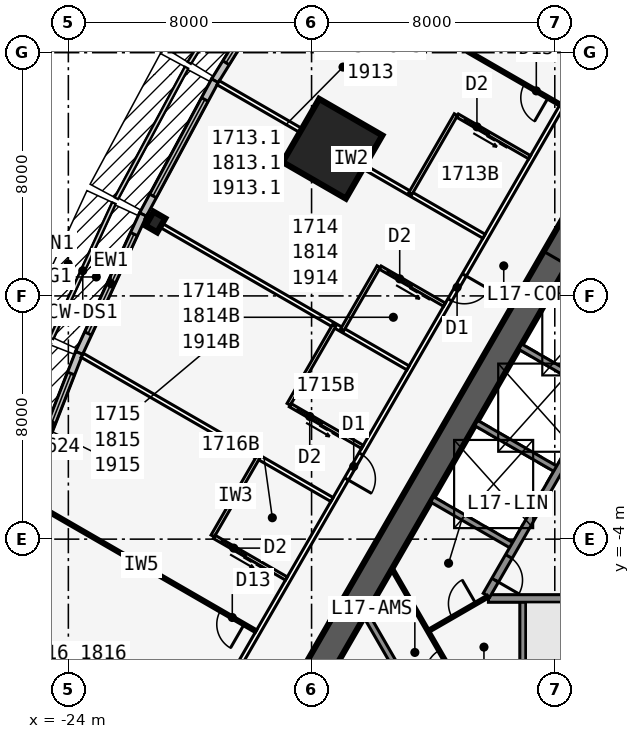
"""IFC4 building model, lengths in metres.
Left out: names, types, materials, properties, quantities, classifications, styles, units other than length and angle.
Written with IfcOpenShell. Run it as: python <this file> out.ifc"""

import sys

from ifc_helpers import new_model, si_unit, direction, frame, frame_2d, origin, origin_2d, place, context, subcontext, project, spatial, rectangle, i_section, extrude, element, fill, save


model = new_model("IFC4")
c1 = context("Model", 3, precision=1e-05, world=origin(), true_north=direction((0.0, 1.0)))
c2 = subcontext(c1, "Body", "Model", "MODEL_VIEW")
j1 = project(units=[si_unit("LENGTHUNIT", "METRE"), si_unit("PLANEANGLEUNIT", "RADIAN")], contexts=[c1])
p1 = place(None, origin())
s1 = spatial("IfcSite", under=j1, at=p1, CompositionType="ELEMENT")
p2 = place(p1, origin())
s2 = spatial("IfcBuilding", under=s1, at=p2, CompositionType="ELEMENT")
p3 = place(p2, frame((0.0, 0.0, 69.3)))
s3 = spatial("IfcBuildingStorey", under=s2, at=p3, CompositionType="ELEMENT", Elevation=69.3)
p4 = place(p3, frame((-10.183, -5.951, 0.0), z_axis=(0.0, 0.0, 1.0), x_axis=(1.0, 0.0, 0.0)))
e1 = element("IfcWall", 1, at=p4, inside=s3, PredefinedType="SOLIDWALL", context=c2, shape_type="SweptSolid", body=[
    extrude(rectangle(XDim=7.633, YDim=0.25, at=frame_2d((3.816, 0.0))), origin(), (0.0, 0.0, 1.0), 3.235),
])
p5 = place(p3, frame((-9.05, -5.951, 0.0), z_axis=(0.0, 0.0, 1.0), x_axis=(0.0, -1.0, 0.0)))
e2 = element("IfcWall", 2, at=p5, inside=s3, PredefinedType="SOLIDWALL", context=c2, shape_type="SweptSolid", body=[
    extrude(rectangle(XDim=3.125, YDim=0.2, at=frame_2d((1.562, 0.0))), origin(), (0.0, 0.0, 1.0), 3.235),
])
p6 = place(p3, frame((0.0, 19.052, 0.0), z_axis=(0.0, 0.0, 1.0), x_axis=(-0.499999749417, -0.866025548458, 0.0)))
e3 = element("IfcWall", 3, at=p6, inside=s3, PredefinedType="SHEAR", context=c2, shape_type="SweptSolid", body=[
    extrude(rectangle(XDim=33.0, YDim=0.9, at=frame_2d((16.5, 0.0))), origin(), (0.0, 0.0, 1.0), 3.4),
])
p7 = place(p6, frame((14.15, 0.0, 0.0)))
e4 = element("IfcOpeningElement", 4, at=p7, cuts=e3, PredefinedType="OPENING", context=c2, shape_type="SweptSolid", body=[
    extrude(rectangle(XDim=1.8, YDim=2.13, at=frame_2d((0.9, 1.065))), frame((0.0, 0.46, 0.0), z_axis=(0.0, -1.0, 0.0), x_axis=(1.0, 0.0, 0.0)), (0.0, 0.0, 1.0), 0.92),
])
p8 = place(p6, frame((12.6, 0.0, 0.0)))
e5 = element("IfcOpeningElement", 5, at=p8, cuts=e3, PredefinedType="OPENING", context=c2, shape_type="SweptSolid", body=[
    extrude(rectangle(XDim=1.0, YDim=2.13, at=frame_2d((0.5, 1.065))), frame((0.0, 0.46, 0.0), z_axis=(0.0, -1.0, 0.0), x_axis=(1.0, 0.0, 0.0)), (0.0, 0.0, 1.0), 0.92),
])
p9 = place(p3, frame((-4.929, 3.365, 0.0), z_axis=(0.0, 0.0, 1.0), x_axis=(-0.499991433582, -0.866030349552, 0.0)))
e6 = element("IfcWall", 6, at=p9, inside=s3, PredefinedType="SOLIDWALL", context=c2, shape_type="SweptSolid", body=[
    extrude(rectangle(XDim=10.633, YDim=0.25, at=frame_2d((5.316, 0.0))), origin(), (0.0, 0.0, 1.0), 3.235),
])
p10 = place(p9, frame((9.164, 0.0, 0.0)))
e7 = element("IfcOpeningElement", 7, at=p10, cuts=e6, PredefinedType="OPENING", context=c2, shape_type="SweptSolid", body=[
    extrude(rectangle(XDim=0.9, YDim=2.13, at=frame_2d((0.45, 1.065))), frame((0.0, 0.135, 0.0), z_axis=(0.0, -1.0, 0.0), x_axis=(1.0, 0.0, 0.0)), (0.0, 0.0, 1.0), 0.27),
])
for number, where, z_axis, x_axis in (
    (8, (-6.429, 0.767, 0.0), (0.0, 0.0, 1.0), (-0.866, 0.5, 0.0)),
    (9, (-7.879, -1.744, 0.0), (0.0, 0.0, 1.0), (-0.866, 0.5, 0.0)),
    (10, (-9.329, -4.256, 0.0), (0.0, 0.0, 1.0), (-0.866, 0.5, 0.0)),
):
    element("IfcWall", number, at=place(p3, frame(where, z_axis=z_axis, x_axis=x_axis)), inside=s3, PredefinedType="SOLIDWALL", context=c2, shape_type="SweptSolid", body=[
        extrude(rectangle(XDim=3.125, YDim=0.2, at=frame_2d((1.562, 0.0))), origin(), (0.0, 0.0, 1.0), 3.235),
    ])
p11 = place(p3, frame((-21.137, 6.43, 0.0), z_axis=(0.0, 0.0, 1.0), x_axis=(-0.866025403784, 0.5, 0.0)))
e11 = element("IfcColumn", 11, at=p11, inside=s3, PredefinedType="COLUMN", context=c2, shape_type="SweptSolid", body=[
    extrude(i_section(OverallWidth=0.442, OverallDepth=0.531, WebThickness=0.066, FlangeThickness=0.106, at=origin_2d()), origin(), (0.0, 0.0, 1.0), 3.4),
])
p12 = place(p3, frame((-15.312, 8.84, 0.0), z_axis=(0.0, 0.0, 1.0), x_axis=(-0.866025403784, 0.5, 0.0)))
e12 = element("IfcColumn", 12, at=p12, inside=s3, PredefinedType="COLUMN", context=c2, shape_type="SweptSolid", body=[
    extrude(rectangle(XDim=2.4, YDim=2.4, at=origin_2d()), origin(), (0.0, 0.0, 1.0), 3.4),
])
p13 = place(p3, frame((-16.551, 15.324, 0.0), z_axis=(0.0, 0.0, 1.0), x_axis=(-0.526132807704, -0.850402415717, 0.0)))
e13 = element("IfcWall", 13, at=p13, inside=s3, PredefinedType="STANDARD", context=c2, shape_type="SweptSolid", body=[
    extrude(rectangle(XDim=5.002, YDim=0.25, at=frame_2d((2.501, 0.0))), origin(), (0.0, 0.0, 1.0), 3.235),
])
p14 = place(p13, frame((0.701, 0.0, 0.45)))
e14 = element("IfcOpeningElement", 14, at=p14, cuts=e13, PredefinedType="OPENING", context=c2, shape_type="SweptSolid", body=[
    extrude(rectangle(XDim=3.6, YDim=2.4, at=frame_2d((1.8, 1.2))), frame((0.0, 0.135, 0.0), z_axis=(0.0, -1.0, 0.0), x_axis=(1.0, 0.0, 0.0)), (0.0, 0.0, 1.0), 0.27),
])
p15 = place(p3, frame((-19.178, 11.077, 0.0), z_axis=(0.0, 0.0, 1.0), x_axis=(-0.473412820489, -0.880840678782, 0.0)))
e15 = element("IfcWall", 15, at=p15, inside=s3, PredefinedType="STANDARD", context=c2, shape_type="SweptSolid", body=[
    extrude(rectangle(XDim=5.002, YDim=0.25, at=frame_2d((2.501, 0.0))), origin(), (0.0, 0.0, 1.0), 3.235),
])
p16 = place(p15, frame((0.701, 0.0, 0.45)))
e16 = element("IfcOpeningElement", 16, at=p16, cuts=e15, PredefinedType="OPENING", context=c2, shape_type="SweptSolid", body=[
    extrude(rectangle(XDim=3.6, YDim=2.4, at=frame_2d((1.8, 1.2))), frame((0.0, 0.135, 0.0), z_axis=(0.0, -1.0, 0.0), x_axis=(1.0, 0.0, 0.0)), (0.0, 0.0, 1.0), 0.27),
])
p17 = place(p3, frame((-21.543, 6.678, 0.0), z_axis=(0.0, 0.0, 1.0), x_axis=(-0.419203100754, -0.907892482796, 0.0)))
e17 = element("IfcWall", 17, at=p17, inside=s3, PredefinedType="STANDARD", context=c2, shape_type="SweptSolid", body=[
    extrude(rectangle(XDim=5.021, YDim=0.25, at=frame_2d((2.51, 0.0))), origin(), (0.0, 0.0, 1.0), 3.235),
])
p18 = place(p17, frame((0.71, 0.0, 0.45)))
e18 = element("IfcOpeningElement", 18, at=p18, cuts=e17, PredefinedType="OPENING", context=c2, shape_type="SweptSolid", body=[
    extrude(rectangle(XDim=3.6, YDim=2.4, at=frame_2d((1.8, 1.2))), frame((0.0, 0.135, 0.0), z_axis=(0.0, -1.0, 0.0), x_axis=(1.0, 0.0, 0.0)), (0.0, 0.0, 1.0), 0.27),
])
p19 = place(p3, frame((-23.645, 2.126, 0.0), z_axis=(0.0, 0.0, 1.0), x_axis=(-0.364013463868, -0.931393685894, 0.0)))
e19 = element("IfcWall", 19, at=p19, inside=s3, PredefinedType="STANDARD", context=c2, shape_type="SweptSolid", body=[
    extrude(rectangle(XDim=5.058, YDim=0.25, at=frame_2d((2.529, 0.0))), origin(), (0.0, 0.0, 1.0), 3.235),
])
p20 = place(p19, frame((0.729, 0.0, 0.45)))
e20 = element("IfcOpeningElement", 20, at=p20, cuts=e19, PredefinedType="OPENING", context=c2, shape_type="SweptSolid", body=[
    extrude(rectangle(XDim=3.6, YDim=2.4, at=frame_2d((1.8, 1.2))), frame((0.0, 0.135, 0.0), z_axis=(0.0, -1.0, 0.0), x_axis=(1.0, 0.0, 0.0)), (0.0, 0.0, 1.0), 0.27),
])
p21 = place(p3, frame((-0.5, 22.836, 0.0), z_axis=(0.0, 0.0, 1.0), x_axis=(-0.500001677587, -0.866024435227, 0.0)))
e21 = element("IfcWall", 21, at=p21, inside=s3, PredefinedType="PARTITIONING", context=c2, shape_type="SweptSolid", body=[
    extrude(rectangle(XDim=39.054, YDim=0.15, at=frame_2d((19.527, 0.0))), origin(), (0.0, 0.0, 1.0), 3.235),
])
p22 = place(p21, frame((1.558, 0.0, 0.0)))
e22 = element("IfcOpeningElement", 22, at=p22, cuts=e21, PredefinedType="OPENING", context=c2, shape_type="SweptSolid", body=[
    extrude(rectangle(XDim=0.95, YDim=2.13, at=frame_2d((0.475, 1.065))), frame((0.0, 0.085, 0.0), z_axis=(0.0, -1.0, 0.0), x_axis=(1.0, 0.0, 0.0)), (0.0, 0.0, 1.0), 0.17),
])
p23 = place(p21, frame((11.552, 0.0, 0.0)))
e23 = element("IfcOpeningElement", 23, at=p23, cuts=e21, PredefinedType="OPENING", context=c2, shape_type="SweptSolid", body=[
    extrude(rectangle(XDim=0.95, YDim=2.13, at=frame_2d((0.475, 1.065))), frame((0.0, 0.085, 0.0), z_axis=(0.0, -1.0, 0.0), x_axis=(1.0, 0.0, 0.0)), (0.0, 0.0, 1.0), 0.17),
])
p24 = place(p21, frame((20.952, 0.0, 0.0)))
e24 = element("IfcOpeningElement", 24, at=p24, cuts=e21, PredefinedType="OPENING", context=c2, shape_type="SweptSolid", body=[
    extrude(rectangle(XDim=0.95, YDim=2.13, at=frame_2d((0.475, 1.065))), frame((0.0, 0.085, 0.0), z_axis=(0.0, -1.0, 0.0), x_axis=(1.0, 0.0, 0.0)), (0.0, 0.0, 1.0), 0.17),
])
p25 = place(p21, frame((27.752, 0.0, 0.0)))
e25 = element("IfcOpeningElement", 25, at=p25, cuts=e21, PredefinedType="OPENING", context=c2, shape_type="SweptSolid", body=[
    extrude(rectangle(XDim=0.95, YDim=2.13, at=frame_2d((0.475, 1.065))), frame((0.0, 0.085, 0.0), z_axis=(0.0, -1.0, 0.0), x_axis=(1.0, 0.0, 0.0)), (0.0, 0.0, 1.0), 0.17),
])
p26 = place(p21, frame((36.546, 0.0, 0.0)))
e26 = element("IfcOpeningElement", 26, at=p26, cuts=e21, PredefinedType="OPENING", context=c2, shape_type="SweptSolid", body=[
    extrude(rectangle(XDim=0.95, YDim=2.13, at=frame_2d((0.475, 1.065))), frame((0.0, 0.085, 0.0), z_axis=(0.0, -1.0, 0.0), x_axis=(1.0, 0.0, 0.0)), (0.0, 0.0, 1.0), 0.17),
])
p27 = place(p3, frame((-7.829, 10.293, 0.0), z_axis=(0.0, 0.0, 1.0), x_axis=(-0.866016302457, 0.50001576363, 0.0)))
e27 = element("IfcWall", 27, at=p27, inside=s3, PredefinedType="PARTITIONING", context=c2, shape_type="SweptSolid", body=[
    extrude(rectangle(XDim=9.943, YDim=0.1, at=frame_2d((4.972, 0.0))), origin(), (0.0, 0.0, 1.0), 2.389),
])
p28 = place(p27, frame((0.45, 0.0, 0.0)))
e28 = element("IfcOpeningElement", 28, at=p28, cuts=e27, PredefinedType="OPENING", context=c2, shape_type="SweptSolid", body=[
    extrude(rectangle(XDim=0.9, YDim=2.13, at=frame_2d((0.45, 1.065))), frame((0.0, 0.06, 0.0), z_axis=(0.0, -1.0, 0.0), x_axis=(1.0, 0.0, 0.0)), (0.0, 0.0, 1.0), 0.12),
])
p29 = place(p3, frame((-10.329, 5.963, 0.0), z_axis=(0.0, 0.0, 1.0), x_axis=(-0.866021688545, 0.500006434927, 0.0)))
e29 = element("IfcWall", 29, at=p29, inside=s3, PredefinedType="PARTITIONING", context=c2, shape_type="SweptSolid", body=[
    extrude(rectangle(XDim=10.096, YDim=0.15, at=frame_2d((5.048, 0.0))), origin(), (0.0, 0.0, 1.0), 2.389),
])
p30 = place(p3, frame((-12.829, 1.633, 0.0), z_axis=(0.0, 0.0, 1.0), x_axis=(-0.866026934769, 0.499997348248, 0.0)))
e30 = element("IfcWall", 30, at=p30, inside=s3, PredefinedType="PARTITIONING", context=c2, shape_type="SweptSolid", body=[
    extrude(rectangle(XDim=9.943, YDim=0.15, at=frame_2d((4.971, 0.0))), origin(), (0.0, 0.0, 1.0), 2.389),
])
p31 = place(p3, frame((-15.329, -2.697, 0.0), z_axis=(0.0, 0.0, 1.0), x_axis=(-0.866018409083, 0.500012114982, 0.0)))
e31 = element("IfcWall", 31, at=p31, inside=s3, PredefinedType="PARTITIONING", context=c2, shape_type="SweptSolid", body=[
    extrude(rectangle(XDim=9.485, YDim=0.15, at=frame_2d((4.742, 0.0))), origin(), (0.0, 0.0, 1.0), 2.389),
])
p32 = place(p3, frame((-17.829, -7.027, 0.0), z_axis=(0.0, 0.0, 1.0), x_axis=(-0.866032659912, 0.499987431809, 0.0)))
e32 = element("IfcWall", 32, at=p32, inside=s3, PredefinedType="PARTITIONING", context=c2, shape_type="SweptSolid", body=[
    extrude(rectangle(XDim=8.72, YDim=0.1, at=frame_2d((4.36, 0.0))), origin(), (0.0, 0.0, 1.0), 2.389),
])
p33 = place(p32, frame((0.45, 0.0, 0.0)))
e33 = element("IfcOpeningElement", 33, at=p33, cuts=e32, PredefinedType="OPENING", context=c2, shape_type="SweptSolid", body=[
    extrude(rectangle(XDim=0.9, YDim=2.13, at=frame_2d((0.45, 1.065))), frame((0.0, 0.06, 0.0), z_axis=(0.0, -1.0, 0.0), x_axis=(1.0, 0.0, 0.0)), (0.0, 0.0, 1.0), 0.12),
])
p34 = place(p3, frame((-11.253, 9.961, 0.0), z_axis=(0.0, 0.0, 1.0), x_axis=(-0.499990139034, -0.866031096941, 0.0)))
e34 = element("IfcWall", 34, at=p34, inside=s3, PredefinedType="PLUMBINGWALL", context=c2, shape_type="SweptSolid", body=[
    extrude(rectangle(XDim=3.0, YDim=0.12, at=frame_2d((1.5, 0.0))), origin(), (0.0, 0.0, 1.0), 3.235),
])
p35 = place(p3, frame((-8.829, 8.561, 0.0), z_axis=(0.0, 0.0, 1.0), x_axis=(-0.866035715982, 0.499982138324, 0.0)))
e35 = element("IfcWall", 35, at=p35, inside=s3, PredefinedType="PLUMBINGWALL", context=c2, shape_type="SweptSolid", body=[
    extrude(rectangle(XDim=2.74, YDim=0.12, at=frame_2d((1.37, 0.0))), origin(), (0.0, 0.0, 1.0), 3.235),
])
p36 = place(p35, frame((1.55, 0.0, 0.0)))
e36 = element("IfcOpeningElement", 36, at=p36, cuts=e35, PredefinedType="OPENING", context=c2, shape_type="SweptSolid", body=[
    extrude(rectangle(XDim=0.9, YDim=2.13, at=frame_2d((0.45, 1.065))), frame((0.0, 0.07, 0.0), z_axis=(0.0, -1.0, 0.0), x_axis=(1.0, 0.0, 0.0)), (0.0, 0.0, 1.0), 0.14),
])
p37 = place(p3, frame((-13.793, 4.961, 0.0), z_axis=(0.0, 0.0, 1.0), x_axis=(-0.500001309137, -0.866024647952, 0.0)))
e37 = element("IfcWall", 37, at=p37, inside=s3, PredefinedType="PLUMBINGWALL", context=c2, shape_type="SweptSolid", body=[
    extrude(rectangle(XDim=2.4, YDim=0.12, at=frame_2d((1.2, 0.0))), origin(), (0.0, 0.0, 1.0), 3.235),
])
p38 = place(p3, frame((-11.628, 3.711, 0.0), z_axis=(0.0, 0.0, 1.0), x_axis=(-0.866048967903, 0.499959183527, 0.0)))
e38 = element("IfcWall", 38, at=p38, inside=s3, PredefinedType="PLUMBINGWALL", context=c2, shape_type="SweptSolid", body=[
    extrude(rectangle(XDim=2.44, YDim=0.12, at=frame_2d((1.22, 0.0))), origin(), (0.0, 0.0, 1.0), 3.235),
])
p39 = place(p38, frame((1.25, 0.0, 0.0)))
e39 = element("IfcOpeningElement", 39, at=p39, cuts=e38, PredefinedType="OPENING", context=c2, shape_type="SweptSolid", body=[
    extrude(rectangle(XDim=0.9, YDim=2.13, at=frame_2d((0.45, 1.065))), frame((0.0, 0.07, 0.0), z_axis=(0.0, -1.0, 0.0), x_axis=(1.0, 0.0, 0.0)), (0.0, 0.0, 1.0), 0.14),
])
p40 = place(p3, frame((-15.253, 3.033, 0.0), z_axis=(0.0, 0.0, 1.0), x_axis=(-0.499990139034, -0.866031096941, 0.0)))
e40 = element("IfcWall", 40, at=p40, inside=s3, PredefinedType="PLUMBINGWALL", context=c2, shape_type="SweptSolid", body=[
    extrude(rectangle(XDim=3.0, YDim=0.12, at=frame_2d((1.5, 0.0))), origin(), (0.0, 0.0, 1.0), 3.235),
])
p41 = place(p3, frame((-14.329, -0.965, 0.0), z_axis=(0.0, 0.0, 1.0), x_axis=(-0.866035715982, 0.499982138324, 0.0)))
e41 = element("IfcWall", 41, at=p41, inside=s3, PredefinedType="PLUMBINGWALL", context=c2, shape_type="SweptSolid", body=[
    extrude(rectangle(XDim=2.74, YDim=0.12, at=frame_2d((1.37, 0.0))), origin(), (0.0, 0.0, 1.0), 3.235),
])
p42 = place(p41, frame((1.55, 0.0, 0.0)))
e42 = element("IfcOpeningElement", 42, at=p42, cuts=e41, PredefinedType="OPENING", context=c2, shape_type="SweptSolid", body=[
    extrude(rectangle(XDim=0.9, YDim=2.13, at=frame_2d((0.45, 1.065))), frame((0.0, 0.07, 0.0), z_axis=(0.0, -1.0, 0.0), x_axis=(1.0, 0.0, 0.0)), (0.0, 0.0, 1.0), 0.14),
])
p43 = place(p3, frame((-17.753, -1.297, 0.0), z_axis=(0.0, 0.0, 1.0), x_axis=(-0.499990139034, -0.866031096941, 0.0)))
e43 = element("IfcWall", 43, at=p43, inside=s3, PredefinedType="PLUMBINGWALL", context=c2, shape_type="SweptSolid", body=[
    extrude(rectangle(XDim=3.0, YDim=0.12, at=frame_2d((1.5, 0.0))), origin(), (0.0, 0.0, 1.0), 3.235),
])
p44 = place(p3, frame((-16.829, -5.295, 0.0), z_axis=(0.0, 0.0, 1.0), x_axis=(-0.866035715982, 0.499982138324, 0.0)))
e44 = element("IfcWall", 44, at=p44, inside=s3, PredefinedType="PLUMBINGWALL", context=c2, shape_type="SweptSolid", body=[
    extrude(rectangle(XDim=2.74, YDim=0.12, at=frame_2d((1.37, 0.0))), origin(), (0.0, 0.0, 1.0), 3.235),
])
p45 = place(p44, frame((1.55, 0.0, 0.0)))
e45 = element("IfcOpeningElement", 45, at=p45, cuts=e44, PredefinedType="OPENING", context=c2, shape_type="SweptSolid", body=[
    extrude(rectangle(XDim=0.9, YDim=2.13, at=frame_2d((0.45, 1.065))), frame((0.0, 0.07, 0.0), z_axis=(0.0, -1.0, 0.0), x_axis=(1.0, 0.0, 0.0)), (0.0, 0.0, 1.0), 0.14),
])
p46 = place(p3, frame((-12.719, -9.076, 0.0), z_axis=(0.0, 0.0, 1.0), x_axis=(-0.499952404951, 0.866052881055, 0.0)))
e46 = element("IfcWall", 46, at=p46, inside=s3, PredefinedType="SOLIDWALL", context=c2, shape_type="SweptSolid", body=[
    extrude(rectangle(XDim=3.002, YDim=0.2, at=frame_2d((1.501, 0.0))), origin(), (0.0, 0.0, 1.0), 3.235),
])
p47 = place(p3, frame((-10.986, -9.076, 0.0), z_axis=(0.0, 0.0, 1.0), x_axis=(-0.499999210213, 0.866025859768, 0.0)))
e47 = element("IfcWall", 47, at=p47, inside=s3, PredefinedType="PARTITIONING", context=c2, shape_type="SweptSolid", body=[
    extrude(rectangle(XDim=4.734, YDim=0.1, at=frame_2d((2.367, 0.0))), origin(), (0.0, 0.0, 1.0), 3.235),
])
p48 = place(p47, frame((0.734, 0.0, 0.0)))
e48 = element("IfcOpeningElement", 48, at=p48, cuts=e47, PredefinedType="OPENING", context=c2, shape_type="SweptSolid", body=[
    extrude(rectangle(XDim=0.9, YDim=2.13, at=frame_2d((0.45, 1.065))), frame((0.0, 0.06, 0.0), z_axis=(0.0, -1.0, 0.0), x_axis=(1.0, 0.0, 0.0)), (0.0, 0.0, 1.0), 0.12),
])
p49 = place(p3, frame((-12.17, -7.026, 0.0), z_axis=(0.0, 0.0, 1.0), x_axis=(0.866015833478, 0.50001657589, 0.0)))
e49 = element("IfcWall", 49, at=p49, inside=s3, PredefinedType="PARTITIONING", context=c2, shape_type="SweptSolid", body=[
    extrude(rectangle(XDim=2.275, YDim=0.1, at=frame_2d((1.138, 0.0))), origin(), (0.0, 0.0, 1.0), 3.235),
])
p50 = place(p49, frame((0.915, 0.0, 0.0)))
e50 = element("IfcOpeningElement", 50, at=p50, cuts=e49, PredefinedType="OPENING", context=c2, shape_type="SweptSolid", body=[
    extrude(rectangle(XDim=0.9, YDim=2.13, at=frame_2d((0.45, 1.065))), frame((0.0, 0.06, 0.0), z_axis=(0.0, -1.0, 0.0), x_axis=(1.0, 0.0, 0.0)), (0.0, 0.0, 1.0), 0.12),
])
p51 = place(p14, origin())
e51 = element("IfcWindow", 51, at=p51, inside=s3, PartitioningType="SINGLE_PANEL", PredefinedType="WINDOW", context=c2, shape_type="SweptSolid", body=[
    extrude(rectangle(XDim=3.6, YDim=2.4, at=frame_2d((1.8, 1.2))), frame((0.0, 0.03, 0.0), z_axis=(0.0, -1.0, 0.0), x_axis=(1.0, 0.0, 0.0)), (0.0, 0.0, 1.0), 0.06),
])
fill(e14, e51)
p52 = place(p16, origin())
e52 = element("IfcWindow", 52, at=p52, inside=s3, PartitioningType="SINGLE_PANEL", PredefinedType="WINDOW", context=c2, shape_type="SweptSolid", body=[
    extrude(rectangle(XDim=3.6, YDim=2.4, at=frame_2d((1.8, 1.2))), frame((0.0, 0.03, 0.0), z_axis=(0.0, -1.0, 0.0), x_axis=(1.0, 0.0, 0.0)), (0.0, 0.0, 1.0), 0.06),
])
fill(e16, e52)
p53 = place(p18, origin())
e53 = element("IfcWindow", 53, at=p53, inside=s3, PartitioningType="SINGLE_PANEL", PredefinedType="WINDOW", context=c2, shape_type="SweptSolid", body=[
    extrude(rectangle(XDim=3.6, YDim=2.4, at=frame_2d((1.8, 1.2))), frame((0.0, 0.03, 0.0), z_axis=(0.0, -1.0, 0.0), x_axis=(1.0, 0.0, 0.0)), (0.0, 0.0, 1.0), 0.06),
])
fill(e18, e53)
p54 = place(p20, origin())
e54 = element("IfcWindow", 54, at=p54, inside=s3, PartitioningType="SINGLE_PANEL", PredefinedType="WINDOW", context=c2, shape_type="SweptSolid", body=[
    extrude(rectangle(XDim=3.6, YDim=2.4, at=frame_2d((1.8, 1.2))), frame((0.0, 0.03, 0.0), z_axis=(0.0, -1.0, 0.0), x_axis=(1.0, 0.0, 0.0)), (0.0, 0.0, 1.0), 0.06),
])
fill(e20, e54)
p55 = place(p28, origin())
e55 = element("IfcDoor", 55, at=p55, inside=s3, OperationType="SINGLE_SWING_LEFT", PredefinedType="DOOR", context=c2, shape_type="SweptSolid", body=[
    extrude(rectangle(XDim=0.9, YDim=2.13, at=frame_2d((0.45, 1.065))), frame((0.0, 0.025, 0.0), z_axis=(0.0, -1.0, 0.0), x_axis=(1.0, 0.0, 0.0)), (0.0, 0.0, 1.0), 0.05),
])
fill(e28, e55)
p56 = place(p33, origin())
e56 = element("IfcDoor", 56, at=p56, inside=s3, OperationType="SINGLE_SWING_LEFT", PredefinedType="DOOR", context=c2, shape_type="SweptSolid", body=[
    extrude(rectangle(XDim=0.9, YDim=2.13, at=frame_2d((0.45, 1.065))), frame((0.0, 0.025, 0.0), z_axis=(0.0, -1.0, 0.0), x_axis=(1.0, 0.0, 0.0)), (0.0, 0.0, 1.0), 0.05),
])
fill(e33, e56)
p57 = place(p36, origin())
e57 = element("IfcDoor", 57, at=p57, inside=s3, OperationType="SLIDING_TO_LEFT", PredefinedType="DOOR", context=c2, shape_type="SweptSolid", body=[
    extrude(rectangle(XDim=0.9, YDim=2.13, at=frame_2d((0.45, 1.065))), frame((0.0, 0.025, 0.0), z_axis=(0.0, -1.0, 0.0), x_axis=(1.0, 0.0, 0.0)), (0.0, 0.0, 1.0), 0.05),
])
fill(e36, e57)
p58 = place(p39, origin())
e58 = element("IfcDoor", 58, at=p58, inside=s3, OperationType="SLIDING_TO_LEFT", PredefinedType="DOOR", context=c2, shape_type="SweptSolid", body=[
    extrude(rectangle(XDim=0.9, YDim=2.13, at=frame_2d((0.45, 1.065))), frame((0.0, 0.025, 0.0), z_axis=(0.0, -1.0, 0.0), x_axis=(1.0, 0.0, 0.0)), (0.0, 0.0, 1.0), 0.05),
])
fill(e39, e58)
p59 = place(p24, origin())
e59 = element("IfcDoor", 59, at=p59, inside=s3, OperationType="SINGLE_SWING_LEFT", PredefinedType="DOOR", context=c2, shape_type="SweptSolid", body=[
    extrude(rectangle(XDim=0.95, YDim=2.13, at=frame_2d((0.475, 1.065))), frame((0.0, 0.025, 0.0), z_axis=(0.0, -1.0, 0.0), x_axis=(1.0, 0.0, 0.0)), (0.0, 0.0, 1.0), 0.05),
])
fill(e24, e59)
p60 = place(p42, origin())
e60 = element("IfcDoor", 60, at=p60, inside=s3, OperationType="SLIDING_TO_LEFT", PredefinedType="DOOR", context=c2, shape_type="SweptSolid", body=[
    extrude(rectangle(XDim=0.9, YDim=2.13, at=frame_2d((0.45, 1.065))), frame((0.0, 0.025, 0.0), z_axis=(0.0, -1.0, 0.0), x_axis=(1.0, 0.0, 0.0)), (0.0, 0.0, 1.0), 0.05),
])
fill(e42, e60)
p61 = place(p25, origin())
e61 = element("IfcDoor", 61, at=p61, inside=s3, OperationType="SINGLE_SWING_RIGHT", PredefinedType="DOOR", context=c2, shape_type="SweptSolid", body=[
    extrude(rectangle(XDim=0.95, YDim=2.13, at=frame_2d((0.475, 1.065))), frame((0.0, 0.025, 0.0), z_axis=(0.0, -1.0, 0.0), x_axis=(1.0, 0.0, 0.0)), (0.0, 0.0, 1.0), 0.05),
])
fill(e25, e61)
p62 = place(p45, origin())
e62 = element("IfcDoor", 62, at=p62, inside=s3, OperationType="SLIDING_TO_LEFT", PredefinedType="DOOR", context=c2, shape_type="SweptSolid", body=[
    extrude(rectangle(XDim=0.9, YDim=2.13, at=frame_2d((0.45, 1.065))), frame((0.0, 0.025, 0.0), z_axis=(0.0, -1.0, 0.0), x_axis=(1.0, 0.0, 0.0)), (0.0, 0.0, 1.0), 0.05),
])
fill(e45, e62)
p63 = place(p7, origin())
e63 = element("IfcDoor", 63, at=p63, inside=s3, OperationType="DOUBLE_DOOR_SINGLE_SWING", PredefinedType="DOOR", context=c2, shape_type="SweptSolid", body=[
    extrude(rectangle(XDim=1.8, YDim=2.13, at=frame_2d((0.9, 1.065))), frame((0.0, 0.025, 0.0), z_axis=(0.0, -1.0, 0.0), x_axis=(1.0, 0.0, 0.0)), (0.0, 0.0, 1.0), 0.05),
])
fill(e4, e63)
p64 = place(p48, origin())
e64 = element("IfcDoor", 64, at=p64, inside=s3, OperationType="SINGLE_SWING_LEFT", PredefinedType="DOOR", context=c2, shape_type="SweptSolid", body=[
    extrude(rectangle(XDim=0.9, YDim=2.13, at=frame_2d((0.45, 1.065))), frame((0.0, 0.025, 0.0), z_axis=(0.0, -1.0, 0.0), x_axis=(1.0, 0.0, 0.0)), (0.0, 0.0, 1.0), 0.05),
])
fill(e48, e64)
p65 = place(p10, origin())
e65 = element("IfcDoor", 65, at=p65, inside=s3, OperationType="SINGLE_SWING_RIGHT", PredefinedType="DOOR", context=c2, shape_type="SweptSolid", body=[
    extrude(rectangle(XDim=0.9, YDim=2.13, at=frame_2d((0.45, 1.065))), frame((0.0, 0.025, 0.0), z_axis=(0.0, -1.0, 0.0), x_axis=(1.0, 0.0, 0.0)), (0.0, 0.0, 1.0), 0.05),
])
fill(e7, e65)
p66 = place(p50, origin())
e66 = element("IfcDoor", 66, at=p66, inside=s3, OperationType="SINGLE_SWING_RIGHT", PredefinedType="DOOR", context=c2, shape_type="SweptSolid", body=[
    extrude(rectangle(XDim=0.9, YDim=2.13, at=frame_2d((0.45, 1.065))), frame((0.0, 0.025, 0.0), z_axis=(0.0, -1.0, 0.0), x_axis=(1.0, 0.0, 0.0)), (0.0, 0.0, 1.0), 0.05),
])
fill(e50, e66)
save(model, sys.argv[1])
